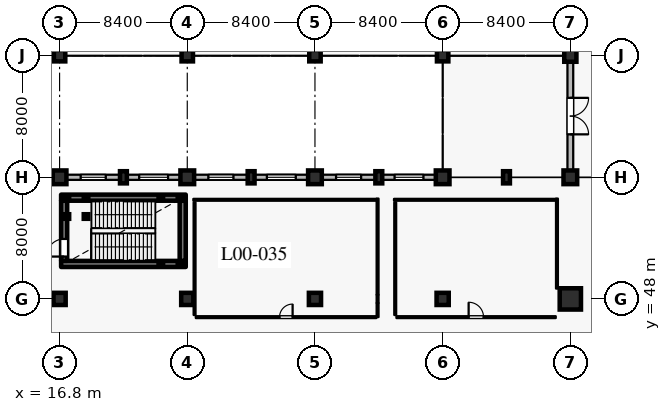
"""IFC4 building model, lengths in metres.
Left out: names, types, materials, properties, quantities, classifications, styles, units other than length and angle.
Written with IfcOpenShell. Run it as: python <this file> out.ifc"""

import sys

from ifc_helpers import new_model, si_unit, direction, frame, frame_2d, origin, origin_2d, place, context, subcontext, project, spatial, rectangle, hollow_rectangle, circle, extrude, element, fill, save


model = new_model("IFC4")
c1 = context("Model", 3, precision=1e-05, world=origin(), true_north=direction((0.0, 1.0)))
c2 = subcontext(c1, "Body", "Model", "MODEL_VIEW")
j1 = project(units=[si_unit("LENGTHUNIT", "METRE"), si_unit("PLANEANGLEUNIT", "RADIAN")], contexts=[c1])
p1 = place(None, origin())
s1 = spatial("IfcSite", under=j1, at=p1, CompositionType="ELEMENT")
p2 = place(p1, origin())
s2 = spatial("IfcBuilding", under=s1, at=p2, CompositionType="ELEMENT")
p3 = place(p2, origin())
s3 = spatial("IfcBuildingStorey", under=s2, at=p3, CompositionType="ELEMENT", Elevation=0.0)
p4 = place(p3, frame((16.8, 48.0, 0.0), z_axis=(0.0, 0.0, 1.0), x_axis=(1.0, 0.0, 0.0)))
e1 = element("IfcColumn", 1, at=p4, inside=s3, PredefinedType="COLUMN", context=c2, shape_type="SweptSolid", body=[
    extrude(rectangle(XDim=0.8, YDim=0.8, at=origin_2d()), origin(), (0.0, 0.0, 1.0), 6.0),
])
p5 = place(p3, frame((16.8, 56.0, 0.0), z_axis=(0.0, 0.0, 1.0), x_axis=(1.0, 0.0, 0.0)))
e2 = element("IfcColumn", 2, at=p5, inside=s3, PredefinedType="COLUMN", context=c2, shape_type="SweptSolid", body=[
    extrude(rectangle(XDim=0.9, YDim=0.9, at=origin_2d()), origin(), (0.0, 0.0, 1.0), 6.0),
])
p6 = place(p3, frame((16.8, 64.0, 0.0), z_axis=(0.0, 0.0, 1.0), x_axis=(1.0, 0.0, 0.0)))
e3 = element("IfcColumn", 3, at=p6, inside=s3, PredefinedType="COLUMN", context=c2, shape_type="SweptSolid", body=[
    extrude(rectangle(XDim=0.75, YDim=0.75, at=origin_2d()), origin(), (0.0, 0.0, 1.0), 6.0),
])
p7 = place(p3, frame((21.0, 56.0, 0.0), z_axis=(0.0, 0.0, 1.0), x_axis=(1.0, 0.0, 0.0)))
e4 = element("IfcColumn", 4, at=p7, inside=s3, PredefinedType="PILASTER", context=c2, shape_type="SweptSolid", body=[
    extrude(rectangle(XDim=0.45, YDim=0.8, at=origin_2d()), origin(), (0.0, 0.0, 1.0), 6.0),
])
p8 = place(p3, frame((25.2, 48.0, 0.0), z_axis=(0.0, 0.0, 1.0), x_axis=(1.0, 0.0, 0.0)))
e5 = element("IfcColumn", 5, at=p8, inside=s3, PredefinedType="COLUMN", context=c2, shape_type="SweptSolid", body=[
    extrude(rectangle(XDim=0.8, YDim=0.8, at=origin_2d()), origin(), (0.0, 0.0, 1.0), 6.0),
])
p9 = place(p3, frame((25.2, 56.0, 0.0), z_axis=(0.0, 0.0, 1.0), x_axis=(1.0, 0.0, 0.0)))
e6 = element("IfcColumn", 6, at=p9, inside=s3, PredefinedType="COLUMN", context=c2, shape_type="SweptSolid", body=[
    extrude(rectangle(XDim=0.9, YDim=0.9, at=origin_2d()), origin(), (0.0, 0.0, 1.0), 6.0),
])
p10 = place(p3, frame((25.2, 64.0, 0.0), z_axis=(0.0, 0.0, 1.0), x_axis=(1.0, 0.0, 0.0)))
e7 = element("IfcColumn", 7, at=p10, inside=s3, PredefinedType="COLUMN", context=c2, shape_type="SweptSolid", body=[
    extrude(rectangle(XDim=0.75, YDim=0.75, at=origin_2d()), origin(), (0.0, 0.0, 1.0), 6.0),
])
p11 = place(p3, frame((29.4, 56.0, 0.0), z_axis=(0.0, 0.0, 1.0), x_axis=(1.0, 0.0, 0.0)))
e8 = element("IfcColumn", 8, at=p11, inside=s3, PredefinedType="PILASTER", context=c2, shape_type="SweptSolid", body=[
    extrude(rectangle(XDim=0.45, YDim=0.8, at=origin_2d()), origin(), (0.0, 0.0, 1.0), 6.0),
])
p12 = place(p3, frame((33.6, 48.0, 0.0), z_axis=(0.0, 0.0, 1.0), x_axis=(1.0, 0.0, 0.0)))
e9 = element("IfcColumn", 9, at=p12, inside=s3, PredefinedType="COLUMN", context=c2, shape_type="SweptSolid", body=[
    extrude(rectangle(XDim=0.8, YDim=0.8, at=origin_2d()), origin(), (0.0, 0.0, 1.0), 6.0),
])
p13 = place(p3, frame((33.6, 56.0, 0.0), z_axis=(0.0, 0.0, 1.0), x_axis=(1.0, 0.0, 0.0)))
e10 = element("IfcColumn", 10, at=p13, inside=s3, PredefinedType="COLUMN", context=c2, shape_type="SweptSolid", body=[
    extrude(rectangle(XDim=0.9, YDim=0.9, at=origin_2d()), origin(), (0.0, 0.0, 1.0), 6.0),
])
p14 = place(p3, frame((33.6, 64.0, 0.0), z_axis=(0.0, 0.0, 1.0), x_axis=(1.0, 0.0, 0.0)))
e11 = element("IfcColumn", 11, at=p14, inside=s3, PredefinedType="COLUMN", context=c2, shape_type="SweptSolid", body=[
    extrude(rectangle(XDim=0.75, YDim=0.75, at=origin_2d()), origin(), (0.0, 0.0, 1.0), 6.0),
])
p15 = place(p3, frame((37.8, 56.0, 0.0), z_axis=(0.0, 0.0, 1.0), x_axis=(1.0, 0.0, 0.0)))
e12 = element("IfcColumn", 12, at=p15, inside=s3, PredefinedType="PILASTER", context=c2, shape_type="SweptSolid", body=[
    extrude(rectangle(XDim=0.45, YDim=0.8, at=origin_2d()), origin(), (0.0, 0.0, 1.0), 6.0),
])
p16 = place(p3, frame((42.0, 48.0, 0.0), z_axis=(0.0, 0.0, 1.0), x_axis=(1.0, 0.0, 0.0)))
e13 = element("IfcColumn", 13, at=p16, inside=s3, PredefinedType="COLUMN", context=c2, shape_type="SweptSolid", body=[
    extrude(rectangle(XDim=0.8, YDim=0.8, at=origin_2d()), origin(), (0.0, 0.0, 1.0), 6.0),
])
p17 = place(p3, frame((42.0, 56.0, 0.0), z_axis=(0.0, 0.0, 1.0), x_axis=(1.0, 0.0, 0.0)))
e14 = element("IfcColumn", 14, at=p17, inside=s3, PredefinedType="COLUMN", context=c2, shape_type="SweptSolid", body=[
    extrude(rectangle(XDim=0.9, YDim=0.9, at=origin_2d()), origin(), (0.0, 0.0, 1.0), 6.0),
])
p18 = place(p3, frame((42.0, 64.0, 0.0), z_axis=(0.0, 0.0, 1.0), x_axis=(1.0, 0.0, 0.0)))
e15 = element("IfcColumn", 15, at=p18, inside=s3, PredefinedType="COLUMN", context=c2, shape_type="SweptSolid", body=[
    extrude(rectangle(XDim=0.75, YDim=0.75, at=origin_2d()), origin(), (0.0, 0.0, 1.0), 6.0),
])
p19 = place(p3, frame((46.2, 56.0, 0.0), z_axis=(0.0, 0.0, 1.0), x_axis=(1.0, 0.0, 0.0)))
e16 = element("IfcColumn", 16, at=p19, inside=s3, PredefinedType="PILASTER", context=c2, shape_type="SweptSolid", body=[
    extrude(rectangle(XDim=0.45, YDim=0.8, at=origin_2d()), origin(), (0.0, 0.0, 1.0), 6.0),
])
p20 = place(p3, frame((50.4, 48.0, 0.0), z_axis=(0.0, 0.0, 1.0), x_axis=(1.0, 0.0, 0.0)))
e17 = element("IfcColumn", 17, at=p20, inside=s3, PredefinedType="COLUMN", context=c2, shape_type="SweptSolid", body=[
    extrude(circle(Radius=0.7, at=origin_2d()), origin(), (0.0, 0.0, 1.0), 6.0),
])
p21 = place(p3, frame((50.4, 56.0, 0.0), z_axis=(0.0, 0.0, 1.0), x_axis=(1.0, 0.0, 0.0)))
e18 = element("IfcColumn", 18, at=p21, inside=s3, PredefinedType="COLUMN", context=c2, shape_type="SweptSolid", body=[
    extrude(rectangle(XDim=0.9, YDim=0.9, at=origin_2d()), origin(), (0.0, 0.0, 1.0), 6.0),
])
p22 = place(p3, frame((50.4, 64.0, 0.0), z_axis=(0.0, 0.0, 1.0), x_axis=(1.0, 0.0, 0.0)))
e19 = element("IfcColumn", 19, at=p22, inside=s3, PredefinedType="COLUMN", context=c2, shape_type="SweptSolid", body=[
    extrude(rectangle(XDim=0.8, YDim=0.8, at=origin_2d()), origin(), (0.0, 0.0, 1.0), 6.0),
])
p23 = place(p3, frame((12.825, 56.0, 0.0), z_axis=(0.0, 0.0, 1.0), x_axis=(1.0, 0.0, 0.0)))
e20 = element("IfcWall", 20, at=p23, inside=s3, PredefinedType="SOLIDWALL", context=c2, shape_type="SweptSolid", body=[
    extrude(rectangle(XDim=3.525, YDim=0.34, at=frame_2d((1.763, 0.0))), origin(), (0.0, 0.0, 1.0), 4.98),
])
p24 = place(p23, frame((0.813, 0.0, 1.25)))
e21 = element("IfcOpeningElement", 21, at=p24, cuts=e20, PredefinedType="OPENING", context=c2, shape_type="SweptSolid", body=[
    extrude(rectangle(XDim=1.9, YDim=1.4, at=frame_2d((0.95, 0.7))), frame((0.0, 0.18, 0.0), z_axis=(0.0, -1.0, 0.0), x_axis=(1.0, 0.0, 0.0)), (0.0, 0.0, 1.0), 0.36),
])
p25 = place(p3, frame((17.25, 56.0, 0.0), z_axis=(0.0, 0.0, 1.0), x_axis=(1.0, 0.0, 0.0)))
e22 = element("IfcWall", 22, at=p25, inside=s3, PredefinedType="SOLIDWALL", context=c2, shape_type="SweptSolid", body=[
    extrude(rectangle(XDim=3.525, YDim=0.34, at=frame_2d((1.762, 0.0))), origin(), (0.0, 0.0, 1.0), 4.98),
])
p26 = place(p25, frame((0.937, 0.0, 1.25)))
e23 = element("IfcOpeningElement", 23, at=p26, cuts=e22, PredefinedType="OPENING", context=c2, shape_type="SweptSolid", body=[
    extrude(rectangle(XDim=1.65, YDim=1.35, at=frame_2d((0.825, 0.675))), frame((0.0, 0.18, 0.0), z_axis=(0.0, -1.0, 0.0), x_axis=(1.0, 0.0, 0.0)), (0.0, 0.0, 1.0), 0.36),
])
p27 = place(p3, frame((21.225, 56.0, 0.0), z_axis=(0.0, 0.0, 1.0), x_axis=(1.0, 0.0, 0.0)))
e24 = element("IfcWall", 24, at=p27, inside=s3, PredefinedType="SOLIDWALL", context=c2, shape_type="SweptSolid", body=[
    extrude(rectangle(XDim=3.525, YDim=0.34, at=frame_2d((1.762, 0.0))), origin(), (0.0, 0.0, 1.0), 4.98),
])
p28 = place(p27, frame((0.812, 0.0, 1.25)))
e25 = element("IfcOpeningElement", 25, at=p28, cuts=e24, PredefinedType="OPENING", context=c2, shape_type="SweptSolid", body=[
    extrude(rectangle(XDim=1.9, YDim=1.4, at=frame_2d((0.95, 0.7))), frame((0.0, 0.18, 0.0), z_axis=(0.0, -1.0, 0.0), x_axis=(1.0, 0.0, 0.0)), (0.0, 0.0, 1.0), 0.36),
])
p29 = place(p3, frame((25.65, 56.0, 0.0), z_axis=(0.0, 0.0, 1.0), x_axis=(1.0, 0.0, 0.0)))
e26 = element("IfcWall", 26, at=p29, inside=s3, PredefinedType="SOLIDWALL", context=c2, shape_type="SweptSolid", body=[
    extrude(rectangle(XDim=3.525, YDim=0.34, at=frame_2d((1.763, 0.0))), origin(), (0.0, 0.0, 1.0), 4.98),
])
p30 = place(p29, frame((0.938, 0.0, 1.25)))
e27 = element("IfcOpeningElement", 27, at=p30, cuts=e26, PredefinedType="OPENING", context=c2, shape_type="SweptSolid", body=[
    extrude(rectangle(XDim=1.65, YDim=1.35, at=frame_2d((0.825, 0.675))), frame((0.0, 0.18, 0.0), z_axis=(0.0, -1.0, 0.0), x_axis=(1.0, 0.0, 0.0)), (0.0, 0.0, 1.0), 0.36),
])
p31 = place(p3, frame((29.625, 56.0, 0.0), z_axis=(0.0, 0.0, 1.0), x_axis=(1.0, 0.0, 0.0)))
e28 = element("IfcWall", 28, at=p31, inside=s3, PredefinedType="SOLIDWALL", context=c2, shape_type="SweptSolid", body=[
    extrude(rectangle(XDim=3.525, YDim=0.34, at=frame_2d((1.762, 0.0))), origin(), (0.0, 0.0, 1.0), 4.98),
])
p32 = place(p31, frame((0.812, 0.0, 1.25)))
e29 = element("IfcOpeningElement", 29, at=p32, cuts=e28, PredefinedType="OPENING", context=c2, shape_type="SweptSolid", body=[
    extrude(rectangle(XDim=1.9, YDim=1.4, at=frame_2d((0.95, 0.7))), frame((0.0, 0.18, 0.0), z_axis=(0.0, -1.0, 0.0), x_axis=(1.0, 0.0, 0.0)), (0.0, 0.0, 1.0), 0.36),
])
p33 = place(p3, frame((34.05, 56.0, 0.0), z_axis=(0.0, 0.0, 1.0), x_axis=(1.0, 0.0, 0.0)))
e30 = element("IfcWall", 30, at=p33, inside=s3, PredefinedType="SOLIDWALL", context=c2, shape_type="SweptSolid", body=[
    extrude(rectangle(XDim=3.525, YDim=0.34, at=frame_2d((1.762, 0.0))), origin(), (0.0, 0.0, 1.0), 4.98),
])
p34 = place(p33, frame((0.938, 0.0, 1.25)))
e31 = element("IfcOpeningElement", 31, at=p34, cuts=e30, PredefinedType="OPENING", context=c2, shape_type="SweptSolid", body=[
    extrude(rectangle(XDim=1.65, YDim=1.35, at=frame_2d((0.825, 0.675))), frame((0.0, 0.18, 0.0), z_axis=(0.0, -1.0, 0.0), x_axis=(1.0, 0.0, 0.0)), (0.0, 0.0, 1.0), 0.36),
])
p35 = place(p3, frame((38.025, 56.0, 0.0), z_axis=(0.0, 0.0, 1.0), x_axis=(1.0, 0.0, 0.0)))
e32 = element("IfcWall", 32, at=p35, inside=s3, PredefinedType="SOLIDWALL", context=c2, shape_type="SweptSolid", body=[
    extrude(rectangle(XDim=3.525, YDim=0.34, at=frame_2d((1.763, 0.0))), origin(), (0.0, 0.0, 1.0), 4.98),
])
p36 = place(p35, frame((0.812, 0.0, 1.25)))
e33 = element("IfcOpeningElement", 33, at=p36, cuts=e32, PredefinedType="OPENING", context=c2, shape_type="SweptSolid", body=[
    extrude(rectangle(XDim=1.9, YDim=1.4, at=frame_2d((0.95, 0.7))), frame((0.0, 0.18, 0.0), z_axis=(0.0, -1.0, 0.0), x_axis=(1.0, 0.0, 0.0)), (0.0, 0.0, 1.0), 0.36),
])
p37 = place(p3, frame((50.4, 63.6, 0.0), z_axis=(0.0, 0.0, 1.0), x_axis=(0.0, -1.0, 0.0)))
e34 = element("IfcWall", 34, at=p37, inside=s3, PredefinedType="SOLIDWALL", context=c2, shape_type="SweptSolid", body=[
    extrude(rectangle(XDim=7.15, YDim=0.38, at=frame_2d((3.575, 0.0))), origin(), (0.0, 0.0, 1.0), 5.0),
])
p38 = place(p37, frame((2.375, 0.0, 0.0)))
e35 = element("IfcOpeningElement", 35, at=p38, cuts=e34, PredefinedType="OPENING", context=c2, shape_type="SweptSolid", body=[
    extrude(rectangle(XDim=2.4, YDim=2.6, at=frame_2d((1.2, 1.3))), frame((0.0, 0.2, 0.0), z_axis=(0.0, -1.0, 0.0), x_axis=(1.0, 0.0, 0.0)), (0.0, 0.0, 1.0), 0.4),
])
p39 = place(p3, frame((16.9, 50.3, 0.0), z_axis=(0.0, 0.0, 1.0), x_axis=(1.0, 0.0, 0.0)))
e36 = element("IfcWall", 36, at=p39, inside=s3, PredefinedType="SHEAR", context=c2, shape_type="SweptSolid", body=[
    extrude(rectangle(XDim=8.2, YDim=0.4, at=frame_2d((4.1, 0.0))), origin(), (0.0, 0.0, 1.0), 5.675),
])
p40 = place(p3, frame((24.9, 50.505, 0.0), z_axis=(0.0, 0.0, 1.0), x_axis=(0.0, 1.0, 0.0)))
e37 = element("IfcWall", 37, at=p40, inside=s3, PredefinedType="SHEAR", context=c2, shape_type="SweptSolid", body=[
    extrude(rectangle(XDim=3.95, YDim=0.4, at=frame_2d((1.975, 0.0))), origin(), (0.0, 0.0, 1.0), 5.675),
])
p41 = place(p3, frame((16.9, 54.66, 0.0), z_axis=(0.0, 0.0, 1.0), x_axis=(1.0, 0.0, 0.0)))
e38 = element("IfcWall", 38, at=p41, inside=s3, PredefinedType="SHEAR", context=c2, shape_type="SweptSolid", body=[
    extrude(rectangle(XDim=8.2, YDim=0.4, at=frame_2d((4.1, 0.0))), origin(), (0.0, 0.0, 1.0), 5.675),
])
p42 = place(p3, frame((17.1, 50.505, 0.0), z_axis=(0.0, 0.0, 1.0), x_axis=(0.0, 1.0, 0.0)))
e39 = element("IfcWall", 39, at=p42, inside=s3, PredefinedType="SHEAR", context=c2, shape_type="SweptSolid", body=[
    extrude(rectangle(XDim=3.95, YDim=0.4, at=frame_2d((1.975, 0.0))), origin(), (0.0, 0.0, 1.0), 5.675),
])
p43 = place(p42, frame((0.28, 0.0, 0.0)))
e40 = element("IfcOpeningElement", 40, at=p43, cuts=e39, PredefinedType="OPENING", context=c2, shape_type="SweptSolid", body=[
    extrude(rectangle(XDim=1.16, YDim=2.2, at=frame_2d((0.58, 1.1))), frame((0.0, 0.21, 0.0), z_axis=(0.0, -1.0, 0.0), x_axis=(1.0, 0.0, 0.0)), (0.0, 0.0, 1.0), 0.42),
])
for number, where, z_axis, x_axis in (
    (41, (17.28, 53.42, 0.0), (0.0, 0.0, 1.0), (1.0, 0.0, 0.0)),
    (42, (17.28, 54.66, 0.0), (0.0, 0.0, 1.0), (1.0, 0.0, 0.0)),
    (43, (18.54, 53.42, 0.0), (0.0, 0.0, 1.0), (1.0, 0.0, 0.0)),
    (44, (18.54, 54.66, 0.0), (0.0, 0.0, 1.0), (1.0, 0.0, 0.0)),
):
    element("IfcColumn", number, at=place(p3, frame(where, z_axis=z_axis, x_axis=x_axis)), inside=s3, PredefinedType="COLUMN", context=c2, shape_type="SweptSolid", body=[
        extrude(hollow_rectangle(XDim=0.3, YDim=0.3, WallThickness=0.012, at=origin_2d()), origin(), (0.0, 0.0, 1.0), 5.82),
    ])
for number, where, z_axis, x_axis in (
    (45, (23.46, 50.3, -2.7), (0.0, 0.0, 1.0), (1.0, 0.0, 0.0)),
    (46, (23.46, 54.66, -2.7), (0.0, 0.0, 1.0), (1.0, 0.0, 0.0)),
    (47, (24.72, 50.3, -2.7), (0.0, 0.0, 1.0), (1.0, 0.0, 0.0)),
    (48, (24.72, 54.66, -2.7), (0.0, 0.0, 1.0), (1.0, 0.0, 0.0)),
):
    element("IfcColumn", number, at=place(p3, frame(where, z_axis=z_axis, x_axis=x_axis)), inside=s3, PredefinedType="COLUMN", context=c2, shape_type="SweptSolid", body=[
        extrude(hollow_rectangle(XDim=0.3, YDim=0.3, WallThickness=0.012, at=origin_2d()), origin(), (0.0, 0.0, 1.0), 5.52),
    ])
p44 = place(p3, frame((25.76, 46.8, 0.0), z_axis=(0.0, 0.0, 1.0), x_axis=(1.0, 0.0, 0.0)))
e49 = element("IfcWall", 49, at=p44, inside=s3, PredefinedType="PARTITIONING", context=c2, shape_type="SweptSolid", body=[
    extrude(rectangle(XDim=11.88, YDim=0.125, at=frame_2d((5.94, 0.0))), origin(), (0.0, 0.0, 1.0), 5.675),
])
p45 = place(p44, frame((5.51, 0.0, 0.0)))
e50 = element("IfcOpeningElement", 50, at=p45, cuts=e49, PredefinedType="OPENING", context=c2, shape_type="SweptSolid", body=[
    extrude(rectangle(XDim=0.86, YDim=2.12, at=frame_2d((0.43, 1.06))), frame((0.0, 0.073, 0.0), z_axis=(0.0, -1.0, 0.0), x_axis=(1.0, 0.0, 0.0)), (0.0, 0.0, 1.0), 0.145),
])
p46 = place(p3, frame((25.68, 46.94, 0.0), z_axis=(0.0, 0.0, 1.0), x_axis=(0.0, 1.0, 0.0)))
e51 = element("IfcWall", 51, at=p46, inside=s3, PredefinedType="PARTITIONING", context=c2, shape_type="SweptSolid", body=[
    extrude(rectangle(XDim=7.41, YDim=0.125, at=frame_2d((3.705, 0.0))), origin(), (0.0, 0.0, 1.0), 5.675),
])
p47 = place(p3, frame((38.96, 46.8, 0.0), z_axis=(0.0, 0.0, 1.0), x_axis=(1.0, 0.0, 0.0)))
e52 = element("IfcWall", 52, at=p47, inside=s3, PredefinedType="PARTITIONING", context=c2, shape_type="SweptSolid", body=[
    extrude(rectangle(XDim=10.48, YDim=0.125, at=frame_2d((5.24, 0.0))), origin(), (0.0, 0.0, 1.0), 5.675),
])
p48 = place(p47, frame((4.75, 0.0, 0.0)))
e53 = element("IfcOpeningElement", 53, at=p48, cuts=e52, PredefinedType="OPENING", context=c2, shape_type="SweptSolid", body=[
    extrude(rectangle(XDim=0.98, YDim=2.15, at=frame_2d((0.49, 1.075))), frame((0.0, 0.073, 0.0), z_axis=(0.0, -1.0, 0.0), x_axis=(1.0, 0.0, 0.0)), (0.0, 0.0, 1.0), 0.145),
])
p49 = place(p3, frame((38.88, 46.94, 0.0), z_axis=(0.0, 0.0, 1.0), x_axis=(0.0, 1.0, 0.0)))
e54 = element("IfcWall", 54, at=p49, inside=s3, PredefinedType="PARTITIONING", context=c2, shape_type="SweptSolid", body=[
    extrude(rectangle(XDim=7.41, YDim=0.125, at=frame_2d((3.705, 0.0))), origin(), (0.0, 0.0, 1.0), 5.675),
])
p50 = place(p3, frame((37.72, 46.804, 0.0), z_axis=(0.0, 0.0, 1.0), x_axis=(0.0, 1.0, 0.0)))
e55 = element("IfcWall", 55, at=p50, inside=s3, PredefinedType="PARTITIONING", context=c2, shape_type="SweptSolid", body=[
    extrude(rectangle(XDim=0.925, YDim=0.125, at=frame_2d((0.462, 0.0))), origin(), (0.0, 0.0, 1.0), 5.28),
])
p51 = place(p3, frame((25.6, 54.52, 0.0), z_axis=(0.0, 0.0, 1.0), x_axis=(1.0, 0.0, 0.0)))
e56 = element("IfcWall", 56, at=p51, inside=s3, PredefinedType="PARTITIONING", context=c2, shape_type="SweptSolid", body=[
    extrude(rectangle(XDim=12.057, YDim=0.125, at=frame_2d((6.028, 0.0))), origin(), (0.0, 0.0, 1.0), 5.675),
])
p52 = place(p3, frame((49.52, 48.679, 0.0), z_axis=(0.0, 0.0, 1.0), x_axis=(0.0, 1.0, 0.0)))
e57 = element("IfcWall", 57, at=p52, inside=s3, PredefinedType="PARTITIONING", context=c2, shape_type="SweptSolid", body=[
    extrude(rectangle(XDim=5.921, YDim=0.125, at=frame_2d((2.96, 0.0))), origin(), (0.0, 0.0, 1.0), 5.675),
])
p53 = place(p3, frame((38.8, 54.52, 0.0), z_axis=(0.0, 0.0, 1.0), x_axis=(1.0, 0.0, 0.0)))
e58 = element("IfcWall", 58, at=p53, inside=s3, PredefinedType="PARTITIONING", context=c2, shape_type="SweptSolid", body=[
    extrude(rectangle(XDim=10.658, YDim=0.125, at=frame_2d((5.329, 0.0))), origin(), (0.0, 0.0, 1.0), 5.675),
])
p54 = place(p3, frame((37.72, 47.729, 0.0), z_axis=(0.0, 0.0, 1.0), x_axis=(0.0, 1.0, 0.0)))
e59 = element("IfcWall", 59, at=p54, inside=s3, PredefinedType="PARTITIONING", context=c2, shape_type="SweptSolid", body=[
    extrude(rectangle(XDim=0.542, YDim=0.125, at=frame_2d((0.271, 0.0))), origin(), (0.0, 0.0, 1.0), 5.675),
])
p55 = place(p3, frame((37.72, 48.271, 0.0), z_axis=(0.0, 0.0, 1.0), x_axis=(0.0, 1.0, 0.0)))
e60 = element("IfcWall", 60, at=p55, inside=s3, PredefinedType="PARTITIONING", context=c2, shape_type="SweptSolid", body=[
    extrude(rectangle(XDim=6.329, YDim=0.125, at=frame_2d((3.165, 0.0))), origin(), (0.0, 0.0, 1.0), 5.28),
])
p56 = place(p26, origin())
e61 = element("IfcWindow", 61, at=p56, inside=s3, PartitioningType="SINGLE_PANEL", PredefinedType="WINDOW", context=c2, shape_type="SweptSolid", body=[
    extrude(rectangle(XDim=1.65, YDim=1.35, at=frame_2d((0.825, 0.675))), frame((0.0, 0.03, 0.0), z_axis=(0.0, -1.0, 0.0), x_axis=(1.0, 0.0, 0.0)), (0.0, 0.0, 1.0), 0.06),
])
fill(e23, e61)
p57 = place(p28, origin())
e62 = element("IfcWindow", 62, at=p57, inside=s3, PartitioningType="DOUBLE_PANEL_VERTICAL", PredefinedType="WINDOW", context=c2, shape_type="SweptSolid", body=[
    extrude(rectangle(XDim=1.9, YDim=1.4, at=frame_2d((0.95, 0.7))), frame((0.0, 0.03, 0.0), z_axis=(0.0, -1.0, 0.0), x_axis=(1.0, 0.0, 0.0)), (0.0, 0.0, 1.0), 0.06),
])
fill(e25, e62)
p58 = place(p30, origin())
e63 = element("IfcWindow", 63, at=p58, inside=s3, PartitioningType="SINGLE_PANEL", PredefinedType="WINDOW", context=c2, shape_type="SweptSolid", body=[
    extrude(rectangle(XDim=1.65, YDim=1.35, at=frame_2d((0.825, 0.675))), frame((0.0, 0.03, 0.0), z_axis=(0.0, -1.0, 0.0), x_axis=(1.0, 0.0, 0.0)), (0.0, 0.0, 1.0), 0.06),
])
fill(e27, e63)
p59 = place(p32, origin())
e64 = element("IfcWindow", 64, at=p59, inside=s3, PartitioningType="DOUBLE_PANEL_VERTICAL", PredefinedType="WINDOW", context=c2, shape_type="SweptSolid", body=[
    extrude(rectangle(XDim=1.9, YDim=1.4, at=frame_2d((0.95, 0.7))), frame((0.0, 0.03, 0.0), z_axis=(0.0, -1.0, 0.0), x_axis=(1.0, 0.0, 0.0)), (0.0, 0.0, 1.0), 0.06),
])
fill(e29, e64)
p60 = place(p34, origin())
e65 = element("IfcWindow", 65, at=p60, inside=s3, PartitioningType="SINGLE_PANEL", PredefinedType="WINDOW", context=c2, shape_type="SweptSolid", body=[
    extrude(rectangle(XDim=1.65, YDim=1.35, at=frame_2d((0.825, 0.675))), frame((0.0, 0.03, 0.0), z_axis=(0.0, -1.0, 0.0), x_axis=(1.0, 0.0, 0.0)), (0.0, 0.0, 1.0), 0.06),
])
fill(e31, e65)
p61 = place(p36, origin())
e66 = element("IfcWindow", 66, at=p61, inside=s3, PartitioningType="DOUBLE_PANEL_VERTICAL", PredefinedType="WINDOW", context=c2, shape_type="SweptSolid", body=[
    extrude(rectangle(XDim=1.9, YDim=1.4, at=frame_2d((0.95, 0.7))), frame((0.0, 0.03, 0.0), z_axis=(0.0, -1.0, 0.0), x_axis=(1.0, 0.0, 0.0)), (0.0, 0.0, 1.0), 0.06),
])
fill(e33, e66)
p62 = place(p38, origin())
e67 = element("IfcDoor", 67, at=p62, inside=s3, OperationType="DOUBLE_DOOR_SINGLE_SWING", PredefinedType="DOOR", context=c2, shape_type="SweptSolid", body=[
    extrude(rectangle(XDim=2.4, YDim=2.6, at=frame_2d((1.2, 1.3))), frame((0.0, 0.025, 0.0), z_axis=(0.0, -1.0, 0.0), x_axis=(1.0, 0.0, 0.0)), (0.0, 0.0, 1.0), 0.05),
])
fill(e35, e67)
p63 = place(p43, origin())
e68 = element("IfcDoor", 68, at=p63, inside=s3, OperationType="SINGLE_SWING_LEFT", PredefinedType="DOOR", context=c2, shape_type="SweptSolid", body=[
    extrude(rectangle(XDim=1.16, YDim=2.2, at=frame_2d((0.58, 1.1))), frame((0.0, 0.025, 0.0), z_axis=(0.0, -1.0, 0.0), x_axis=(1.0, 0.0, 0.0)), (0.0, 0.0, 1.0), 0.05),
])
fill(e40, e68)
p64 = place(p45, origin())
e69 = element("IfcDoor", 69, at=p64, inside=s3, OperationType="SINGLE_SWING_RIGHT", PredefinedType="DOOR", context=c2, shape_type="SweptSolid", body=[
    extrude(rectangle(XDim=0.86, YDim=2.12, at=frame_2d((0.43, 1.06))), frame((0.0, 0.025, 0.0), z_axis=(0.0, -1.0, 0.0), x_axis=(1.0, 0.0, 0.0)), (0.0, 0.0, 1.0), 0.05),
])
fill(e50, e69)
p65 = place(p48, origin())
e70 = element("IfcDoor", 70, at=p65, inside=s3, OperationType="SINGLE_SWING_LEFT", PredefinedType="DOOR", context=c2, shape_type="SweptSolid", body=[
    extrude(rectangle(XDim=0.98, YDim=2.15, at=frame_2d((0.49, 1.075))), frame((0.0, 0.025, 0.0), z_axis=(0.0, -1.0, 0.0), x_axis=(1.0, 0.0, 0.0)), (0.0, 0.0, 1.0), 0.05),
])
fill(e53, e70)
save(model, sys.argv[1])
